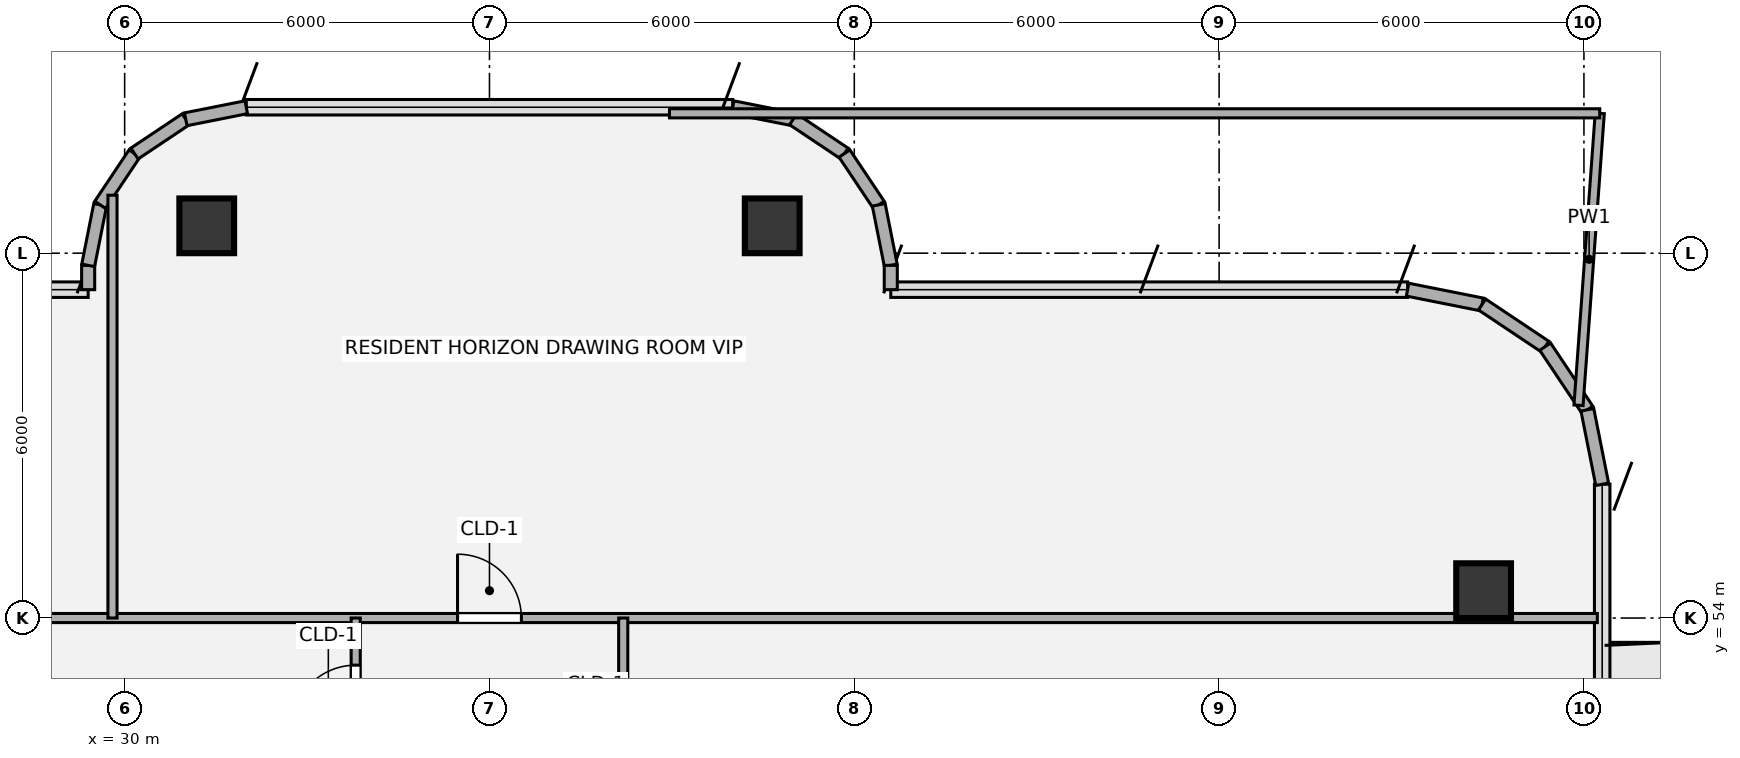
"""IFC4 building model, lengths in metres.
Left out: names, types, materials, properties, quantities, classifications, styles, units other than length and angle.
Written with IfcOpenShell. Run it as: python <this file> out.ifc"""

import sys

from ifc_helpers import new_model, si_unit, direction, frame, frame_2d, origin, origin_2d, place, context, subcontext, project, spatial, rectangle, hollow_circle, extrude, source, transform, mapped, element, fill, save


model = new_model("IFC4")
c1 = context("Model", 3, precision=1e-05, world=origin(), true_north=direction((0.0, 1.0)))
c2 = subcontext(c1, "Body", "Model", "MODEL_VIEW")
j1 = project(units=[si_unit("LENGTHUNIT", "METRE"), si_unit("PLANEANGLEUNIT", "RADIAN")], contexts=[c1])
p1 = place(None, origin())
s1 = spatial("IfcSite", under=j1, at=p1, CompositionType="ELEMENT")
p2 = place(p1, origin())
s2 = spatial("IfcBuilding", under=s1, at=p2, CompositionType="ELEMENT")
p3 = place(p2, frame((0.0, 0.0, 287.28)))
s3 = spatial("IfcBuildingStorey", under=s2, at=p3, CompositionType="ELEMENT", Elevation=287.28)
m1 = source(origin(), c2, "Body", "SweptSolid", [
    extrude(hollow_circle(Radius=0.45, WallThickness=0.032, at=origin_2d()), origin(), (0.0, 0.0, 1.0), 3.78),
])
for number, where, z_axis, x_axis in (
    (1, (52.35, 54.45, 0.0), (0.0, 0.0, 1.0), (1.0, 0.0, 0.0)),
    (2, (31.35, 60.45, 0.0), (0.0, 0.0, 1.0), (1.0, 0.0, 0.0)),
    (3, (40.65, 60.45, 0.0), (0.0, 0.0, 1.0), (1.0, 0.0, 0.0)),
):
    element("IfcColumn", number, at=place(p3, frame(where, z_axis=z_axis, x_axis=x_axis)), inside=s3, PredefinedType="COLUMN", context=c2, shape_type="MappedRepresentation", body=[
        mapped(m1, transform((0.0, 0.0, 0.0), x_axis=(1.0, 0.0, 0.0), y_axis=(0.0, 1.0, 0.0), z_axis=(0.0, 0.0, 1.0), scale=1.0)),
    ])
p4 = place(p3, frame((29.4, 59.4, 0.0), z_axis=(0.0, 0.0, 1.0), x_axis=(0.0, 1.0, 0.0)))
e4 = element("IfcWall", 4, at=p4, inside=s3, PredefinedType="SOLIDWALL", context=c2, shape_type="SweptSolid", body=[
    extrude(rectangle(XDim=0.4, YDim=0.215, at=frame_2d((0.2, 0.0))), origin(), (0.0, 0.0, 1.0), 3.46),
])
p5 = place(p3, frame((29.4, 59.8, 0.0), z_axis=(0.0, 0.0, 1.0), x_axis=(0.195190360752, 0.980765376158, 0.0)))
e5 = element("IfcWall", 5, at=p5, inside=s3, PredefinedType="SOLIDWALL", context=c2, shape_type="SweptSolid", body=[
    extrude(rectangle(XDim=1.014, YDim=0.215, at=frame_2d((0.507, 0.0))), origin(), (0.0, 0.0, 1.0), 3.46),
])
p6 = place(p3, frame((29.598, 60.795, 0.0), z_axis=(0.0, 0.0, 1.0), x_axis=(0.555643898837, 0.831420385657, 0.0)))
e6 = element("IfcWall", 6, at=p6, inside=s3, PredefinedType="SOLIDWALL", context=c2, shape_type="SweptSolid", body=[
    extrude(rectangle(XDim=1.015, YDim=0.215, at=frame_2d((0.507, 0.0))), origin(), (0.0, 0.0, 1.0), 3.46),
])
p7 = place(p3, frame((30.162, 61.638, 0.0), z_axis=(0.0, 0.0, 1.0), x_axis=(0.831346067305, 0.555755086685, 0.0)))
e7 = element("IfcWall", 7, at=p7, inside=s3, PredefinedType="SOLIDWALL", context=c2, shape_type="SweptSolid", body=[
    extrude(rectangle(XDim=1.014, YDim=0.215, at=frame_2d((0.507, 0.0))), origin(), (0.0, 0.0, 1.0), 3.46),
])
for number, where, z_axis, x_axis in (
    (8, (31.005, 62.202, 0.0), (0.0, 0.0, 1.0), (0.981, 0.195, 0.0)),
    (9, (40.0, 62.4, 0.0), (0.0, 0.0, 1.0), (0.981, -0.195, 0.0)),
):
    element("IfcWall", number, at=place(p3, frame(where, z_axis=z_axis, x_axis=x_axis)), inside=s3, PredefinedType="SOLIDWALL", context=c2, shape_type="SweptSolid", body=[
        extrude(rectangle(XDim=1.015, YDim=0.215, at=frame_2d((0.507, 0.0))), origin(), (0.0, 0.0, 1.0), 3.46),
    ])
p8 = place(p3, frame((40.995, 62.202, 0.0), z_axis=(0.0, 0.0, 1.0), x_axis=(0.831346067305, -0.555755086685, 0.0)))
e10 = element("IfcWall", 10, at=p8, inside=s3, PredefinedType="SOLIDWALL", context=c2, shape_type="SweptSolid", body=[
    extrude(rectangle(XDim=1.014, YDim=0.215, at=frame_2d((0.507, 0.0))), origin(), (0.0, 0.0, 1.0), 3.46),
])
p9 = place(p3, frame((41.838, 61.638, 0.0), z_axis=(0.0, 0.0, 1.0), x_axis=(0.555643898837, -0.831420385657, 0.0)))
e11 = element("IfcWall", 11, at=p9, inside=s3, PredefinedType="SOLIDWALL", context=c2, shape_type="SweptSolid", body=[
    extrude(rectangle(XDim=1.015, YDim=0.215, at=frame_2d((0.507, 0.0))), origin(), (0.0, 0.0, 1.0), 3.46),
])
p10 = place(p3, frame((42.402, 60.795, 0.0), z_axis=(0.0, 0.0, 1.0), x_axis=(0.195190360752, -0.980765376158, 0.0)))
e12 = element("IfcWall", 12, at=p10, inside=s3, PredefinedType="SOLIDWALL", context=c2, shape_type="SweptSolid", body=[
    extrude(rectangle(XDim=1.014, YDim=0.215, at=frame_2d((0.507, 0.0))), origin(), (0.0, 0.0, 1.0), 3.46),
])
p11 = place(p3, frame((42.6, 59.8, 0.0), z_axis=(0.0, 0.0, 1.0), x_axis=(0.0, -1.0, 0.0)))
e13 = element("IfcWall", 13, at=p11, inside=s3, PredefinedType="SOLIDWALL", context=c2, shape_type="SweptSolid", body=[
    extrude(rectangle(XDim=0.4, YDim=0.215, at=frame_2d((0.2, 0.0))), origin(), (0.0, 0.0, 1.0), 3.46),
])
for number, where, z_axis, x_axis in (
    (14, (51.1, 59.4, 0.0), (0.0, 0.0, 1.0), (0.981, -0.195, 0.0)),
    (15, (52.325, 59.156, 0.0), (0.0, 0.0, 1.0), (0.831, -0.556, 0.0)),
    (16, (53.363, 58.463, 0.0), (0.0, 0.0, 1.0), (0.556, -0.831, 0.0)),
    (17, (54.056, 57.425, 0.0), (0.0, 0.0, 1.0), (0.195, -0.981, 0.0)),
):
    element("IfcWall", number, at=place(p3, frame(where, z_axis=z_axis, x_axis=x_axis)), inside=s3, PredefinedType="SOLIDWALL", context=c2, shape_type="SweptSolid", body=[
        extrude(rectangle(XDim=1.249, YDim=0.215, at=frame_2d((0.624, 0.0))), origin(), (0.0, 0.0, 1.0), 3.46),
    ])
p12 = place(p3, frame((53.911, 57.499, 0.0), z_axis=(0.0, 0.0, 1.0), x_axis=(0.072519186203, 0.997367017518, 0.0)))
e18 = element("IfcWall", 18, at=p12, inside=s3, PredefinedType="PARTITIONING", context=c2, shape_type="SweptSolid", body=[
    extrude(rectangle(XDim=4.814, YDim=0.15, at=frame_2d((2.407, 0.0))), origin(), (0.0, 0.0, 1.0), 3.43),
])
p13 = place(p3, frame((17.78, 54.0, 0.0), z_axis=(0.0, 0.0, 1.0), x_axis=(1.0, 0.0, 0.0)))
e19 = element("IfcWall", 19, at=p13, inside=s3, PredefinedType="PARTITIONING", context=c2, shape_type="SweptSolid", body=[
    extrude(rectangle(XDim=36.44, YDim=0.15, at=frame_2d((18.22, 0.0))), origin(), (0.0, 0.0, 1.0), 2.985),
])
p14 = place(p13, frame((17.695, 0.0, 0.0)))
e20 = element("IfcOpeningElement", 20, at=p14, cuts=e19, PredefinedType="OPENING", context=c2, shape_type="SweptSolid", body=[
    extrude(rectangle(XDim=1.05, YDim=2.1, at=origin_2d()), frame((0.525, 0.085, 1.05), z_axis=(0.0, -1.0, 0.0), x_axis=(1.0, 0.0, 0.0)), (0.0, 0.0, 1.0), 0.17),
])
p15 = place(p3, frame((38.96, 62.3, 0.0), z_axis=(0.0, 0.0, 1.0), x_axis=(1.0, 0.0, 0.0)))
e21 = element("IfcWall", 21, at=p15, inside=s3, PredefinedType="PARTITIONING", context=c2, shape_type="SweptSolid", body=[
    extrude(rectangle(XDim=15.3, YDim=0.15, at=frame_2d((7.65, 0.0))), origin(), (0.0, 0.0, 1.0), 3.43),
])
p16 = place(p3, frame((29.8, 54.0, 0.0), z_axis=(0.0, 0.0, 1.0), x_axis=(0.0, 1.0, 0.0)))
e22 = element("IfcWall", 22, at=p16, inside=s3, PredefinedType="PARTITIONING", context=c2, shape_type="SweptSolid", body=[
    extrude(rectangle(XDim=6.954, YDim=0.15, at=frame_2d((3.477, 0.0))), origin(), (0.0, 0.0, 1.0), 3.43),
])
p17 = place(p3, frame((33.8, 42.0, 0.0), z_axis=(0.0, 0.0, 1.0), x_axis=(0.0, 1.0, 0.0)))
e23 = element("IfcWall", 23, at=p17, inside=s3, PredefinedType="PARTITIONING", context=c2, shape_type="SweptSolid", body=[
    extrude(rectangle(XDim=12.0, YDim=0.15, at=frame_2d((6.0, 0.0))), origin(), (0.0, 0.0, 1.0), 3.43),
])
p18 = place(p17, frame((10.175, 0.0, 0.0)))
e24 = element("IfcOpeningElement", 24, at=p18, cuts=e23, PredefinedType="OPENING", context=c2, shape_type="SweptSolid", body=[
    extrude(rectangle(XDim=1.05, YDim=2.1, at=origin_2d()), frame((0.525, 0.085, 1.05), z_axis=(0.0, -1.0, 0.0), x_axis=(1.0, 0.0, 0.0)), (0.0, 0.0, 1.0), 0.17),
])
p19 = place(p3, frame((38.2, 49.8, 0.0), z_axis=(0.0, 0.0, 1.0), x_axis=(0.0, 1.0, 0.0)))
e25 = element("IfcWall", 25, at=p19, inside=s3, PredefinedType="PARTITIONING", context=c2, shape_type="SweptSolid", body=[
    extrude(rectangle(XDim=4.2, YDim=0.15, at=frame_2d((2.1, 0.0))), origin(), (0.0, 0.0, 1.0), 3.43),
])
p20 = place(p19, frame((1.575, 0.0, 0.0)))
e26 = element("IfcOpeningElement", 26, at=p20, cuts=e25, PredefinedType="OPENING", context=c2, shape_type="SweptSolid", body=[
    extrude(rectangle(XDim=1.05, YDim=2.1, at=origin_2d()), frame((0.525, 0.085, 1.05), z_axis=(0.0, -1.0, 0.0), x_axis=(1.0, 0.0, 0.0)), (0.0, 0.0, 1.0), 0.17),
])
m2 = source(origin(), c2, "Body", "SweptSolid", [
    extrude(rectangle(XDim=1.05, YDim=2.1, at=origin_2d()), frame((0.525, 0.025, 1.05), z_axis=(0.0, -1.0, 0.0), x_axis=(1.0, 0.0, 0.0)), (0.0, 0.0, 1.0), 0.05),
])
p21 = place(p14, origin())
e27 = element("IfcDoor", 27, at=p21, inside=s3, OperationType="SINGLE_SWING_LEFT", PredefinedType="DOOR", context=c2, shape_type="MappedRepresentation", body=[
    mapped(m2, transform((0.0, 0.0, 0.0), x_axis=(1.0, 0.0, 0.0), y_axis=(0.0, 1.0, 0.0), z_axis=(0.0, 0.0, 1.0), scale=1.0)),
])
fill(e20, e27)
p22 = place(p18, origin())
e28 = element("IfcDoor", 28, at=p22, inside=s3, OperationType="SINGLE_SWING_LEFT", PredefinedType="DOOR", context=c2, shape_type="MappedRepresentation", body=[
    mapped(m2, transform((0.0, 0.0, 0.0), x_axis=(1.0, 0.0, 0.0), y_axis=(0.0, 1.0, 0.0), z_axis=(0.0, 0.0, 1.0), scale=1.0)),
])
fill(e24, e28)
save(model, sys.argv[1])
